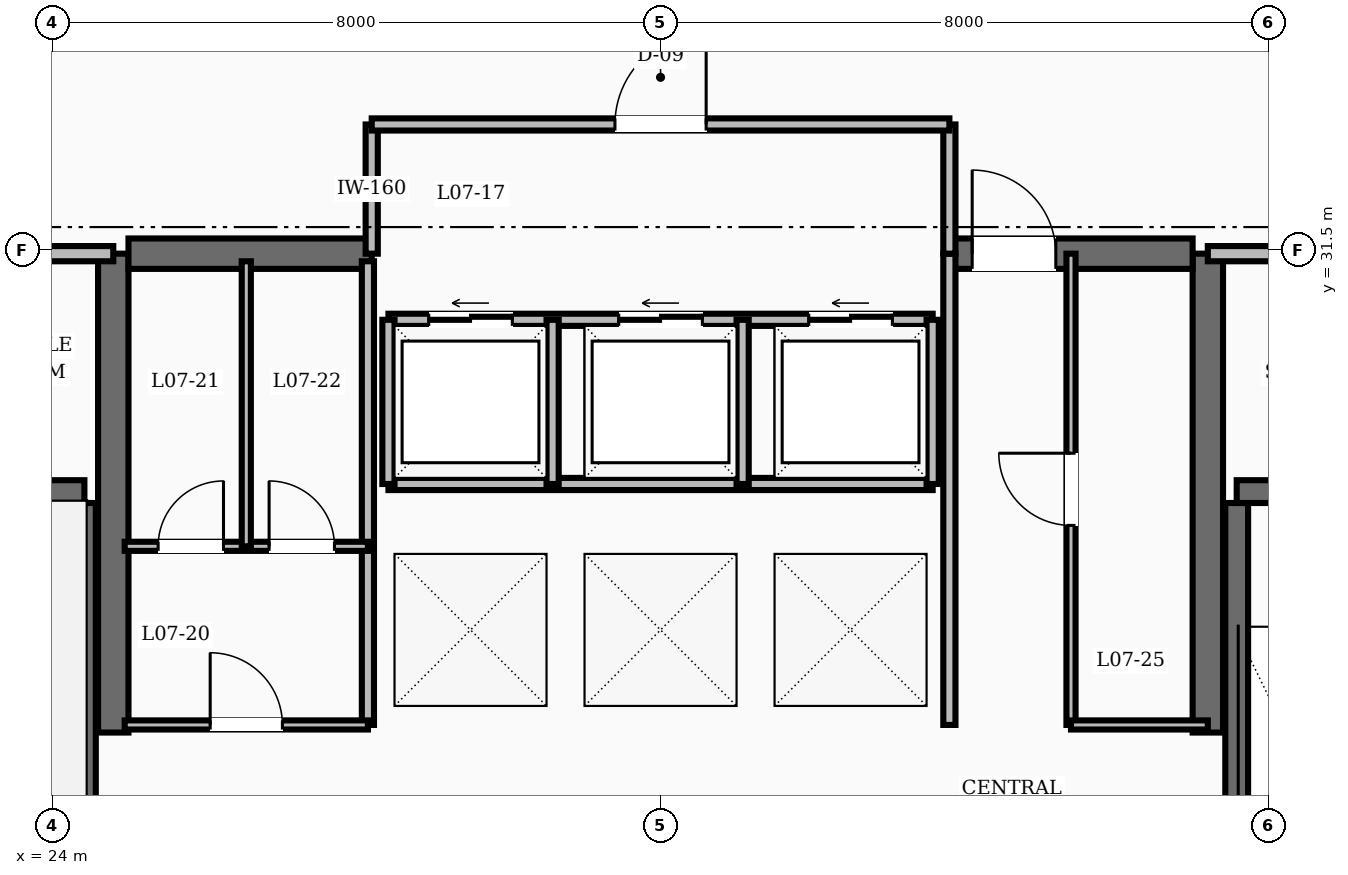
"""IFC4 building model, lengths in metres.
Left out: names, types, materials, properties, quantities, classifications, styles, units other than length and angle.
Written with IfcOpenShell. Run it as: python <this file> out.ifc"""

import sys

from ifc_helpers import new_model, si_unit, direction, frame, frame_2d, origin, place, context, subcontext, project, spatial, rectangle, extrude, element, fill, save


model = new_model("IFC4")
c1 = context("Model", 3, precision=1e-05, world=origin(), true_north=direction((0.0, 1.0)))
c2 = subcontext(c1, "Body", "Model", "MODEL_VIEW")
j1 = project(units=[si_unit("LENGTHUNIT", "METRE"), si_unit("PLANEANGLEUNIT", "RADIAN")], contexts=[c1])
p1 = place(None, origin())
s1 = spatial("IfcSite", under=j1, at=p1, CompositionType="ELEMENT")
p2 = place(p1, origin())
s2 = spatial("IfcBuilding", under=s1, at=p2, CompositionType="ELEMENT")
p3 = place(p2, frame((0.0, 0.0, 34.0)))
s3 = spatial("IfcBuildingStorey", under=s2, at=p3, CompositionType="ELEMENT", Elevation=34.0)
for number, where, z_axis, x_axis in (
    (1, (24.8, 25.15, 0.0), (0.0, 0.0, 1.0), (0.0, 1.0, 0.0)),
    (2, (39.2, 25.15, 0.0), (0.0, 0.0, 1.0), (0.0, 1.0, 0.0)),
):
    element("IfcWall", number, at=place(p3, frame(where, z_axis=z_axis, x_axis=x_axis)), inside=s3, PredefinedType="SHEAR", context=c2, shape_type="SweptSolid", body=[
        extrude(rectangle(XDim=6.3, YDim=0.4, at=frame_2d((3.15, 0.0))), origin(), (0.0, 0.0, 1.0), 3.6),
    ])
p4 = place(p3, frame((25.0, 31.45, 0.0), z_axis=(0.0, 0.0, 1.0), x_axis=(1.0, 0.0, 0.0)))
e3 = element("IfcWall", 3, at=p4, inside=s3, PredefinedType="SHEAR", context=c2, shape_type="SweptSolid", body=[
    extrude(rectangle(XDim=3.2, YDim=0.4, at=frame_2d((1.6, 0.0))), origin(), (0.0, 0.0, 1.0), 3.6),
])
p5 = place(p3, frame((35.8, 31.45, 0.0), z_axis=(0.0, 0.0, 1.0), x_axis=(1.0, 0.0, 0.0)))
e4 = element("IfcWall", 4, at=p5, inside=s3, PredefinedType="SHEAR", context=c2, shape_type="SweptSolid", body=[
    extrude(rectangle(XDim=3.2, YDim=0.4, at=frame_2d((1.6, 0.0))), origin(), (0.0, 0.0, 1.0), 3.6),
])
p6 = place(p5, frame((0.3, 0.0, 0.0)))
e5 = element("IfcOpeningElement", 5, at=p6, cuts=e4, PredefinedType="OPENING", context=c2, shape_type="SweptSolid", body=[
    extrude(rectangle(XDim=1.1, YDim=2.1, at=frame_2d((0.55, 1.05))), frame((0.0, 0.21, 0.0), z_axis=(0.0, -1.0, 0.0), x_axis=(1.0, 0.0, 0.0)), (0.0, 0.0, 1.0), 0.42),
])
p7 = place(p3, frame((24.42, 19.43, 0.0), z_axis=(0.0, 0.0, 1.0), x_axis=(0.0, 1.0, 0.0)))
e6 = element("IfcWall", 6, at=p7, inside=s3, PredefinedType="SHEAR", context=c2, shape_type="SweptSolid", body=[
    extrude(rectangle(XDim=8.74, YDim=0.3, at=frame_2d((4.37, 0.0))), origin(), (0.0, 0.0, 1.0), 3.6),
])
p8 = place(p3, frame((20.82, 28.32, 0.0), z_axis=(0.0, 0.0, 1.0), x_axis=(1.0, 0.0, 0.0)))
e7 = element("IfcWall", 7, at=p8, inside=s3, PredefinedType="SHEAR", context=c2, shape_type="SweptSolid", body=[
    extrude(rectangle(XDim=3.6, YDim=0.3, at=frame_2d((1.8, 0.0))), origin(), (0.0, 0.0, 1.0), 3.6),
])
p9 = place(p3, frame((39.58, 19.43, 0.0), z_axis=(0.0, 0.0, 1.0), x_axis=(0.0, 1.0, 0.0)))
e8 = element("IfcWall", 8, at=p9, inside=s3, PredefinedType="SHEAR", context=c2, shape_type="SweptSolid", body=[
    extrude(rectangle(XDim=8.74, YDim=0.3, at=frame_2d((4.37, 0.0))), origin(), (0.0, 0.0, 1.0), 3.6),
])
p10 = place(p3, frame((39.58, 28.32, 0.0), z_axis=(0.0, 0.0, 1.0), x_axis=(1.0, 0.0, 0.0)))
e9 = element("IfcWall", 9, at=p10, inside=s3, PredefinedType="SHEAR", context=c2, shape_type="SweptSolid", body=[
    extrude(rectangle(XDim=3.6, YDim=0.3, at=frame_2d((1.8, 0.0))), origin(), (0.0, 0.0, 1.0), 3.6),
])
p11 = place(p10, frame((1.3, 0.0, 0.0)))
e10 = element("IfcOpeningElement", 10, at=p11, cuts=e9, PredefinedType="OPENING", context=c2, shape_type="SweptSolid", body=[
    extrude(rectangle(XDim=1.1, YDim=2.1, at=frame_2d((0.55, 1.05))), frame((0.0, 0.16, 0.0), z_axis=(0.0, -1.0, 0.0), x_axis=(1.0, 0.0, 0.0)), (0.0, 0.0, 1.0), 0.32),
])
for number, where, z_axis, x_axis in (
    (11, (39.2, 31.45, 0.0), (0.0, 0.0, 1.0), (1.0, 0.0, 0.0)),
    (12, (20.82, 31.45, 0.0), (0.0, 0.0, 1.0), (1.0, 0.0, 0.0)),
):
    element("IfcWall", number, at=place(p3, frame(where, z_axis=z_axis, x_axis=x_axis)), inside=s3, PredefinedType="SOLIDWALL", context=c2, shape_type="SweptSolid", body=[
        extrude(rectangle(XDim=3.98, YDim=0.2, at=frame_2d((1.99, 0.0))), origin(), (0.0, 0.0, 1.0), 2.61),
    ])
p12 = place(p3, frame((35.8, 25.25, 0.0), z_axis=(0.0, 0.0, 1.0), x_axis=(0.0, 1.0, 0.0)))
e13 = element("IfcWall", 13, at=p12, inside=s3, PredefinedType="SOLIDWALL", context=c2, shape_type="SweptSolid", body=[
    extrude(rectangle(XDim=6.2, YDim=0.16, at=frame_2d((3.1, 0.0))), origin(), (0.0, 0.0, 1.0), 2.61),
])
p13 = place(p3, frame((28.42, 30.58, 0.0), z_axis=(0.0, 0.0, 1.0), x_axis=(1.0, 0.0, 0.0)))
e14 = element("IfcWall", 14, at=p13, inside=s3, PredefinedType="SOLIDWALL", context=c2, shape_type="SweptSolid", body=[
    extrude(rectangle(XDim=7.16, YDim=0.16, at=frame_2d((3.58, 0.0))), origin(), (0.0, 0.0, 1.0), 2.61),
])
p14 = place(p13, frame((0.53, 0.0, 0.0)))
e15 = element("IfcOpeningElement", 15, at=p14, cuts=e14, PredefinedType="OPENING", context=c2, shape_type="SweptSolid", body=[
    extrude(rectangle(XDim=1.1, YDim=2.15, at=frame_2d((0.55, 1.075))), frame((0.0, 0.09, 0.0), z_axis=(0.0, -1.0, 0.0), x_axis=(1.0, 0.0, 0.0)), (0.0, 0.0, 1.0), 0.18),
])
p15 = place(p13, frame((3.03, 0.0, 0.0)))
e16 = element("IfcOpeningElement", 16, at=p15, cuts=e14, PredefinedType="OPENING", context=c2, shape_type="SweptSolid", body=[
    extrude(rectangle(XDim=1.1, YDim=2.15, at=frame_2d((0.55, 1.075))), frame((0.0, 0.09, 0.0), z_axis=(0.0, -1.0, 0.0), x_axis=(1.0, 0.0, 0.0)), (0.0, 0.0, 1.0), 0.18),
])
p16 = place(p13, frame((5.53, 0.0, 0.0)))
e17 = element("IfcOpeningElement", 17, at=p16, cuts=e14, PredefinedType="OPENING", context=c2, shape_type="SweptSolid", body=[
    extrude(rectangle(XDim=1.1, YDim=2.15, at=frame_2d((0.55, 1.075))), frame((0.0, 0.09, 0.0), z_axis=(0.0, -1.0, 0.0), x_axis=(1.0, 0.0, 0.0)), (0.0, 0.0, 1.0), 0.18),
])
p17 = place(p3, frame((28.42, 28.42, 0.0), z_axis=(0.0, 0.0, 1.0), x_axis=(1.0, 0.0, 0.0)))
e18 = element("IfcWall", 18, at=p17, inside=s3, PredefinedType="SOLIDWALL", context=c2, shape_type="SweptSolid", body=[
    extrude(rectangle(XDim=7.16, YDim=0.16, at=frame_2d((3.58, 0.0))), origin(), (0.0, 0.0, 1.0), 2.61),
])
for number, where, z_axis, x_axis in (
    (19, (28.42, 28.42, 0.0), (0.0, 0.0, 1.0), (0.0, 1.0, 0.0)),
    (20, (30.58, 28.42, 0.0), (0.0, 0.0, 1.0), (0.0, 1.0, 0.0)),
    (21, (33.08, 28.42, 0.0), (0.0, 0.0, 1.0), (0.0, 1.0, 0.0)),
    (22, (35.58, 28.42, 0.0), (0.0, 0.0, 1.0), (0.0, 1.0, 0.0)),
):
    element("IfcWall", number, at=place(p3, frame(where, z_axis=z_axis, x_axis=x_axis)), inside=s3, PredefinedType="SOLIDWALL", context=c2, shape_type="SweptSolid", body=[
        extrude(rectangle(XDim=2.16, YDim=0.16, at=frame_2d((1.08, 0.0))), origin(), (0.0, 0.0, 1.0), 2.61),
    ])
for number, where, z_axis, x_axis in (
    (23, (28.2, 31.45, 0.0), (0.0, 0.0, 1.0), (0.0, 1.0, 0.0)),
    (24, (35.8, 31.45, 0.0), (0.0, 0.0, 1.0), (0.0, 1.0, 0.0)),
):
    element("IfcWall", number, at=place(p3, frame(where, z_axis=z_axis, x_axis=x_axis)), inside=s3, PredefinedType="SOLIDWALL", context=c2, shape_type="SweptSolid", body=[
        extrude(rectangle(XDim=1.7, YDim=0.16, at=frame_2d((0.85, 0.0))), origin(), (0.0, 0.0, 1.0), 2.61),
    ])
p18 = place(p3, frame((28.2, 33.15, 0.0), z_axis=(0.0, 0.0, 1.0), x_axis=(1.0, 0.0, 0.0)))
e25 = element("IfcWall", 25, at=p18, inside=s3, PredefinedType="SOLIDWALL", context=c2, shape_type="SweptSolid", body=[
    extrude(rectangle(XDim=7.6, YDim=0.16, at=frame_2d((3.8, 0.0))), origin(), (0.0, 0.0, 1.0), 2.61),
])
p19 = place(p18, frame((3.2, 0.0, 0.0)))
e26 = element("IfcOpeningElement", 26, at=p19, cuts=e25, PredefinedType="OPENING", context=c2, shape_type="SweptSolid", body=[
    extrude(rectangle(XDim=1.2, YDim=2.1, at=frame_2d((0.6, 1.05))), frame((0.0, 0.09, 0.0), z_axis=(0.0, -1.0, 0.0), x_axis=(1.0, 0.0, 0.0)), (0.0, 0.0, 1.0), 0.18),
])
p20 = place(p3, frame((28.15, 25.25, 0.0), z_axis=(0.0, 0.0, 1.0), x_axis=(0.0, 1.0, 0.0)))
e27 = element("IfcWall", 27, at=p20, inside=s3, PredefinedType="SOLIDWALL", context=c2, shape_type="SweptSolid", body=[
    extrude(rectangle(XDim=6.1, YDim=0.16, at=frame_2d((3.05, 0.0))), origin(), (0.0, 0.0, 1.0), 2.61),
])
p21 = place(p3, frame((24.95, 25.25, 0.0), z_axis=(0.0, 0.0, 1.0), x_axis=(1.0, 0.0, 0.0)))
e28 = element("IfcWall", 28, at=p21, inside=s3, PredefinedType="PARTITIONING", context=c2, shape_type="SweptSolid", body=[
    extrude(rectangle(XDim=3.2, YDim=0.12, at=frame_2d((1.6, 0.0))), origin(), (0.0, 0.0, 1.0), 2.61),
])
p22 = place(p21, frame((1.125, 0.0, 0.0)))
e29 = element("IfcOpeningElement", 29, at=p22, cuts=e28, PredefinedType="OPENING", context=c2, shape_type="SweptSolid", body=[
    extrude(rectangle(XDim=0.95, YDim=2.1, at=frame_2d((0.475, 1.05))), frame((0.0, 0.07, 0.0), z_axis=(0.0, -1.0, 0.0), x_axis=(1.0, 0.0, 0.0)), (0.0, 0.0, 1.0), 0.14),
])
p23 = place(p3, frame((37.4, 25.25, 0.0), z_axis=(0.0, 0.0, 1.0), x_axis=(0.0, 1.0, 0.0)))
e30 = element("IfcWall", 30, at=p23, inside=s3, PredefinedType="PARTITIONING", context=c2, shape_type="SweptSolid", body=[
    extrude(rectangle(XDim=6.2, YDim=0.12, at=frame_2d((3.1, 0.0))), origin(), (0.0, 0.0, 1.0), 2.61),
])
p24 = place(p23, frame((2.625, 0.0, 0.0)))
e31 = element("IfcOpeningElement", 31, at=p24, cuts=e30, PredefinedType="OPENING", context=c2, shape_type="SweptSolid", body=[
    extrude(rectangle(XDim=0.95, YDim=2.1, at=frame_2d((0.475, 1.05))), frame((0.0, 0.07, 0.0), z_axis=(0.0, -1.0, 0.0), x_axis=(1.0, 0.0, 0.0)), (0.0, 0.0, 1.0), 0.14),
])
p25 = place(p3, frame((37.4, 25.25, 0.0), z_axis=(0.0, 0.0, 1.0), x_axis=(1.0, 0.0, 0.0)))
e32 = element("IfcWall", 32, at=p25, inside=s3, PredefinedType="PARTITIONING", context=c2, shape_type="SweptSolid", body=[
    extrude(rectangle(XDim=1.8, YDim=0.12, at=frame_2d((0.9, 0.0))), origin(), (0.0, 0.0, 1.0), 2.61),
])
p26 = place(p3, frame((24.95, 27.6, 0.0), z_axis=(0.0, 0.0, 1.0), x_axis=(1.0, 0.0, 0.0)))
e33 = element("IfcWall", 33, at=p26, inside=s3, PredefinedType="PARTITIONING", context=c2, shape_type="SweptSolid", body=[
    extrude(rectangle(XDim=3.2, YDim=0.12, at=frame_2d((1.6, 0.0))), origin(), (0.0, 0.0, 1.0), 2.61),
])
p27 = place(p26, frame((0.44, 0.0, 0.0)))
e34 = element("IfcOpeningElement", 34, at=p27, cuts=e33, PredefinedType="OPENING", context=c2, shape_type="SweptSolid", body=[
    extrude(rectangle(XDim=0.86, YDim=2.1, at=frame_2d((0.43, 1.05))), frame((0.0, 0.07, 0.0), z_axis=(0.0, -1.0, 0.0), x_axis=(1.0, 0.0, 0.0)), (0.0, 0.0, 1.0), 0.14),
])
p28 = place(p26, frame((1.9, 0.0, 0.0)))
e35 = element("IfcOpeningElement", 35, at=p28, cuts=e33, PredefinedType="OPENING", context=c2, shape_type="SweptSolid", body=[
    extrude(rectangle(XDim=0.86, YDim=2.1, at=frame_2d((0.43, 1.05))), frame((0.0, 0.07, 0.0), z_axis=(0.0, -1.0, 0.0), x_axis=(1.0, 0.0, 0.0)), (0.0, 0.0, 1.0), 0.14),
])
p29 = place(p3, frame((26.55, 27.6, 0.0), z_axis=(0.0, 0.0, 1.0), x_axis=(0.0, 1.0, 0.0)))
e36 = element("IfcWall", 36, at=p29, inside=s3, PredefinedType="PARTITIONING", context=c2, shape_type="SweptSolid", body=[
    extrude(rectangle(XDim=3.75, YDim=0.12, at=frame_2d((1.875, 0.0))), origin(), (0.0, 0.0, 1.0), 2.61),
])
p30 = place(p6, origin())
e37 = element("IfcDoor", 37, at=p30, inside=s3, OperationType="SINGLE_SWING_LEFT", PredefinedType="DOOR", context=c2, shape_type="SweptSolid", body=[
    extrude(rectangle(XDim=1.1, YDim=2.1, at=frame_2d((0.55, 1.05))), frame((0.0, 0.025, 0.0), z_axis=(0.0, -1.0, 0.0), x_axis=(1.0, 0.0, 0.0)), (0.0, 0.0, 1.0), 0.05),
])
fill(e5, e37)
p31 = place(p14, origin())
e38 = element("IfcDoor", 38, at=p31, inside=s3, OperationType="SLIDING_TO_LEFT", PredefinedType="DOOR", context=c2, shape_type="SweptSolid", body=[
    extrude(rectangle(XDim=1.1, YDim=2.15, at=frame_2d((0.55, 1.075))), frame((0.0, 0.025, 0.0), z_axis=(0.0, -1.0, 0.0), x_axis=(1.0, 0.0, 0.0)), (0.0, 0.0, 1.0), 0.05),
])
fill(e15, e38)
p32 = place(p15, origin())
e39 = element("IfcDoor", 39, at=p32, inside=s3, OperationType="SLIDING_TO_LEFT", PredefinedType="DOOR", context=c2, shape_type="SweptSolid", body=[
    extrude(rectangle(XDim=1.1, YDim=2.15, at=frame_2d((0.55, 1.075))), frame((0.0, 0.025, 0.0), z_axis=(0.0, -1.0, 0.0), x_axis=(1.0, 0.0, 0.0)), (0.0, 0.0, 1.0), 0.05),
])
fill(e16, e39)
p33 = place(p16, origin())
e40 = element("IfcDoor", 40, at=p33, inside=s3, OperationType="SLIDING_TO_LEFT", PredefinedType="DOOR", context=c2, shape_type="SweptSolid", body=[
    extrude(rectangle(XDim=1.1, YDim=2.15, at=frame_2d((0.55, 1.075))), frame((0.0, 0.025, 0.0), z_axis=(0.0, -1.0, 0.0), x_axis=(1.0, 0.0, 0.0)), (0.0, 0.0, 1.0), 0.05),
])
fill(e17, e40)
p34 = place(p19, origin())
e41 = element("IfcDoor", 41, at=p34, inside=s3, OperationType="SINGLE_SWING_RIGHT", PredefinedType="DOOR", context=c2, shape_type="SweptSolid", body=[
    extrude(rectangle(XDim=1.2, YDim=2.1, at=frame_2d((0.6, 1.05))), frame((0.0, 0.025, 0.0), z_axis=(0.0, -1.0, 0.0), x_axis=(1.0, 0.0, 0.0)), (0.0, 0.0, 1.0), 0.05),
])
fill(e26, e41)
p35 = place(p22, origin())
e42 = element("IfcDoor", 42, at=p35, inside=s3, OperationType="SINGLE_SWING_LEFT", PredefinedType="DOOR", context=c2, shape_type="SweptSolid", body=[
    extrude(rectangle(XDim=0.95, YDim=2.1, at=frame_2d((0.475, 1.05))), frame((0.0, 0.025, 0.0), z_axis=(0.0, -1.0, 0.0), x_axis=(1.0, 0.0, 0.0)), (0.0, 0.0, 1.0), 0.05),
])
fill(e29, e42)
p36 = place(p27, origin())
e43 = element("IfcDoor", 43, at=p36, inside=s3, OperationType="SINGLE_SWING_RIGHT", PredefinedType="DOOR", context=c2, shape_type="SweptSolid", body=[
    extrude(rectangle(XDim=0.86, YDim=2.1, at=frame_2d((0.43, 1.05))), frame((0.0, 0.025, 0.0), z_axis=(0.0, -1.0, 0.0), x_axis=(1.0, 0.0, 0.0)), (0.0, 0.0, 1.0), 0.05),
])
fill(e34, e43)
p37 = place(p28, origin())
e44 = element("IfcDoor", 44, at=p37, inside=s3, OperationType="SINGLE_SWING_LEFT", PredefinedType="DOOR", context=c2, shape_type="SweptSolid", body=[
    extrude(rectangle(XDim=0.86, YDim=2.1, at=frame_2d((0.43, 1.05))), frame((0.0, 0.025, 0.0), z_axis=(0.0, -1.0, 0.0), x_axis=(1.0, 0.0, 0.0)), (0.0, 0.0, 1.0), 0.05),
])
fill(e35, e44)
p38 = place(p24, origin())
e45 = element("IfcDoor", 45, at=p38, inside=s3, OperationType="SINGLE_SWING_RIGHT", PredefinedType="DOOR", context=c2, shape_type="SweptSolid", body=[
    extrude(rectangle(XDim=0.95, YDim=2.1, at=frame_2d((0.475, 1.05))), frame((0.0, 0.025, 0.0), z_axis=(0.0, -1.0, 0.0), x_axis=(1.0, 0.0, 0.0)), (0.0, 0.0, 1.0), 0.05),
])
fill(e31, e45)
save(model, sys.argv[1])
